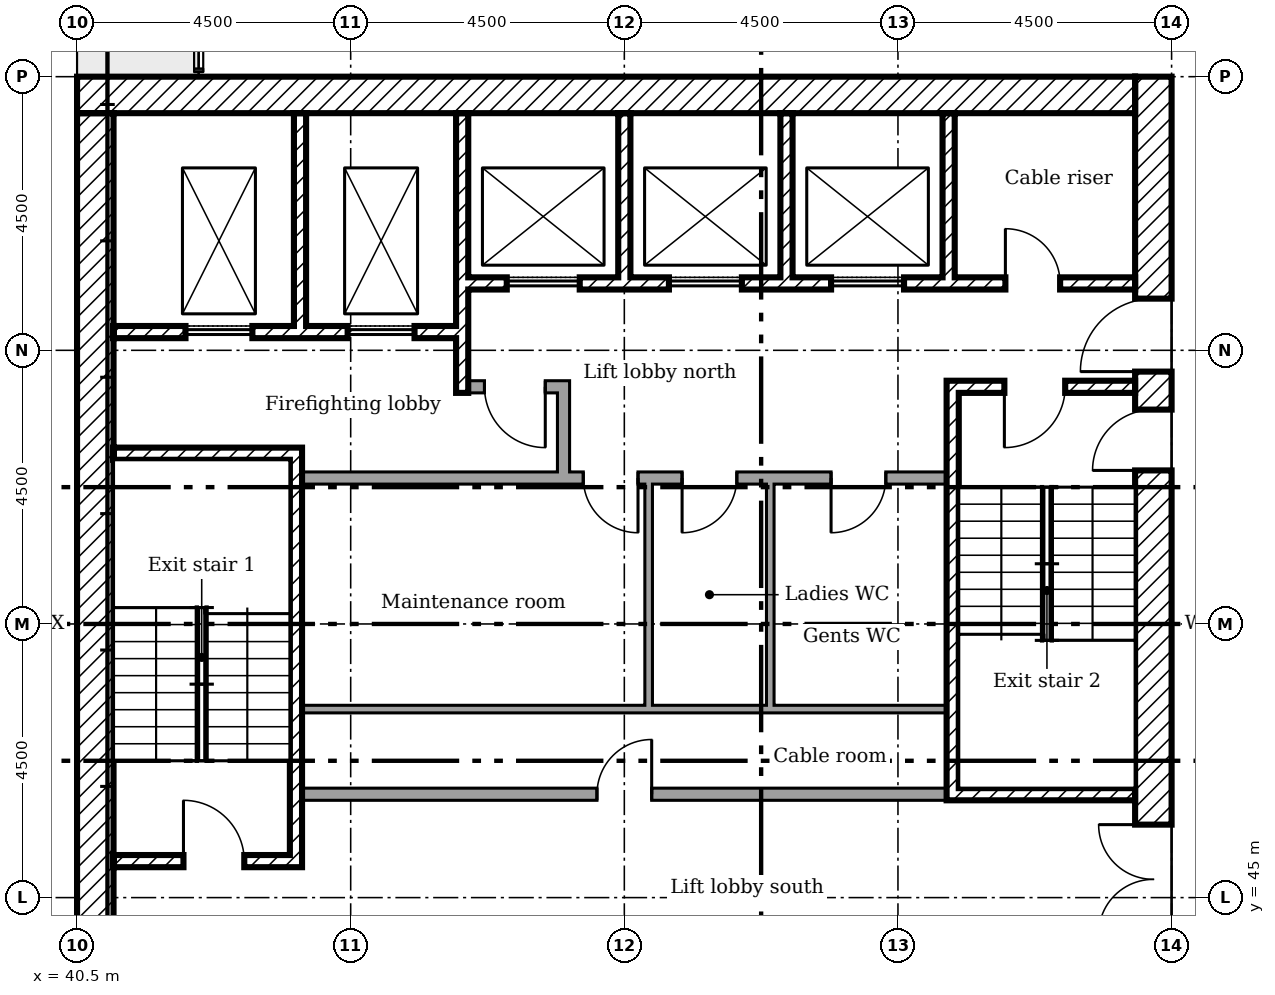
"""IFC4 building model, lengths in metres.
Left out: names, types, materials, properties, quantities, classifications, styles, units other than length and angle.
Written with IfcOpenShell. Run it as: python <this file> out.ifc"""

import sys

from ifc_helpers import new_model, si_unit, direction, frame, frame_2d, origin, place, context, subcontext, project, spatial, rectangle, extrude, element, fill, save


model = new_model("IFC4")
c1 = context("Model", 3, precision=1e-05, world=origin(), true_north=direction((0.0, 1.0)))
c2 = subcontext(c1, "Body", "Model", "MODEL_VIEW")
j1 = project(units=[si_unit("LENGTHUNIT", "METRE"), si_unit("PLANEANGLEUNIT", "RADIAN")], contexts=[c1])
p1 = place(None, origin())
s1 = spatial("IfcSite", under=j1, at=p1, CompositionType="ELEMENT")
p2 = place(p1, origin())
s2 = spatial("IfcBuilding", under=s1, at=p2, CompositionType="ELEMENT")
p3 = place(p2, frame((0.0, 0.0, 172.6)))
s3 = spatial("IfcBuildingStorey", under=s2, at=p3, CompositionType="ELEMENT", Elevation=172.6)
p4 = place(p3, frame((58.2, 40.5, 0.0), z_axis=(0.0, 0.0, 1.0), x_axis=(0.0, 1.0, 0.0)))
e1 = element("IfcWall", 1, at=p4, inside=s3, PredefinedType="SHEAR", context=c2, shape_type="SweptSolid", body=[
    extrude(rectangle(XDim=18.0, YDim=0.6, at=frame_2d((9.0, 0.0))), origin(), (0.0, 0.0, 1.0), 3.35),
])
p5 = place(p4, frame((13.15, 0.0, 0.0)))
e2 = element("IfcOpeningElement", 2, at=p5, cuts=e1, PredefinedType="OPENING", context=c2, shape_type="SweptSolid", body=[
    extrude(rectangle(XDim=1.2, YDim=2.1, at=frame_2d((0.6, 1.05))), frame((0.0, 0.31, 0.0), z_axis=(0.0, -1.0, 0.0), x_axis=(1.0, 0.0, 0.0)), (0.0, 0.0, 1.0), 0.62),
])
p6 = place(p4, frame((3.9, 0.0, 0.0)))
e3 = element("IfcOpeningElement", 3, at=p6, cuts=e1, PredefinedType="OPENING", context=c2, shape_type="SweptSolid", body=[
    extrude(rectangle(XDim=1.8, YDim=2.1, at=frame_2d((0.9, 1.05))), frame((0.0, 0.31, 0.0), z_axis=(0.0, -1.0, 0.0), x_axis=(1.0, 0.0, 0.0)), (0.0, 0.0, 1.0), 0.62),
])
p7 = place(p4, frame((11.525, 0.0, 0.0)))
e4 = element("IfcOpeningElement", 4, at=p7, cuts=e1, PredefinedType="OPENING", context=c2, shape_type="SweptSolid", body=[
    extrude(rectangle(XDim=1.0, YDim=2.1, at=frame_2d((0.5, 1.05))), frame((0.0, 0.31, 0.0), z_axis=(0.0, -1.0, 0.0), x_axis=(1.0, 0.0, 0.0)), (0.0, 0.0, 1.0), 0.62),
])
p8 = place(p3, frame((40.5, 58.2, 0.0)))
e5 = element("IfcWall", 5, at=p8, inside=s3, PredefinedType="SHEAR", context=c2, shape_type="SweptSolid", body=[
    extrude(rectangle(XDim=17.4, YDim=0.6, at=frame_2d((8.7, 0.0))), origin(), (0.0, 0.0, 1.0), 3.35),
])
p9 = place(p3, frame((40.8, 41.1, 0.0), z_axis=(0.0, 0.0, 1.0), x_axis=(0.0, 1.0, 0.0)))
e6 = element("IfcWall", 6, at=p9, inside=s3, PredefinedType="SHEAR", context=c2, shape_type="SweptSolid", body=[
    extrude(rectangle(XDim=16.8, YDim=0.6, at=frame_2d((8.4, 0.0))), origin(), (0.0, 0.0, 1.0), 3.35),
])
p10 = place(p3, frame((44.167, 57.9, 0.0), z_axis=(0.0, 0.0, 1.0), x_axis=(0.0, -1.0, 0.0)))
e7 = element("IfcWall", 7, at=p10, inside=s3, PredefinedType="SHEAR", context=c2, shape_type="SweptSolid", body=[
    extrude(rectangle(XDim=3.5, YDim=0.2, at=frame_2d((1.75, 0.0))), origin(), (0.0, 0.0, 1.0), 3.35),
])
p11 = place(p3, frame((46.833, 57.9, 0.0), z_axis=(0.0, 0.0, 1.0), x_axis=(0.0, -1.0, 0.0)))
e8 = element("IfcWall", 8, at=p11, inside=s3, PredefinedType="SHEAR", context=c2, shape_type="SweptSolid", body=[
    extrude(rectangle(XDim=4.6, YDim=0.2, at=frame_2d((2.3, 0.0))), origin(), (0.0, 0.0, 1.0), 3.35),
])
for number, where, z_axis, x_axis in (
    (9, (49.5, 57.9, 0.0), (0.0, 0.0, 1.0), (0.0, -1.0, 0.0)),
    (10, (52.167, 57.9, 0.0), (0.0, 0.0, 1.0), (0.0, -1.0, 0.0)),
    (11, (54.833, 57.9, 0.0), (0.0, 0.0, 1.0), (0.0, -1.0, 0.0)),
):
    element("IfcWall", number, at=place(p3, frame(where, z_axis=z_axis, x_axis=x_axis)), inside=s3, PredefinedType="SHEAR", context=c2, shape_type="SweptSolid", body=[
        extrude(rectangle(XDim=2.7, YDim=0.2, at=frame_2d((1.35, 0.0))), origin(), (0.0, 0.0, 1.0), 3.35),
    ])
p12 = place(p3, frame((48.5, 51.9, 0.0), z_axis=(0.0, 0.0, 1.0), x_axis=(0.0, 1.0, 0.0)))
e12 = element("IfcWall", 12, at=p12, inside=s3, PredefinedType="PARTITIONING", context=c2, shape_type="SweptSolid", body=[
    extrude(rectangle(XDim=1.6, YDim=0.2, at=frame_2d((0.8, 0.0))), origin(), (0.0, 0.0, 1.0), 3.35),
])
p13 = place(p3, frame((46.933, 53.4, 0.0)))
e13 = element("IfcWall", 13, at=p13, inside=s3, PredefinedType="PARTITIONING", context=c2, shape_type="SweptSolid", body=[
    extrude(rectangle(XDim=1.467, YDim=0.2, at=frame_2d((0.733, 0.0))), origin(), (0.0, 0.0, 1.0), 3.35),
])
p14 = place(p13, frame((0.267, 0.0, 0.0)))
e14 = element("IfcOpeningElement", 14, at=p14, cuts=e13, PredefinedType="OPENING", context=c2, shape_type="SweptSolid", body=[
    extrude(rectangle(XDim=1.0, YDim=2.1, at=frame_2d((0.5, 1.05))), frame((0.0, 0.11, 0.0), z_axis=(0.0, -1.0, 0.0), x_axis=(1.0, 0.0, 0.0)), (0.0, 0.0, 1.0), 0.22),
])
p15 = place(p3, frame((46.933, 55.1, 0.0)))
e15 = element("IfcWall", 15, at=p15, inside=s3, PredefinedType="SHEAR", context=c2, shape_type="SweptSolid", body=[
    extrude(rectangle(XDim=10.967, YDim=0.2, at=frame_2d((5.483, 0.0))), origin(), (0.0, 0.0, 1.0), 3.35),
])
p16 = place(p15, frame((8.833, 0.0, 0.0)))
e16 = element("IfcOpeningElement", 16, at=p16, cuts=e15, PredefinedType="OPENING", context=c2, shape_type="SweptSolid", body=[
    extrude(rectangle(XDim=0.9, YDim=2.1, at=frame_2d((0.45, 1.05))), frame((0.0, 0.11, 0.0), z_axis=(0.0, -1.0, 0.0), x_axis=(1.0, 0.0, 0.0)), (0.0, 0.0, 1.0), 0.22),
])
p17 = place(p15, frame((0.633, 0.0, 0.0)))
e17 = element("IfcOpeningElement", 17, at=p17, cuts=e15, PredefinedType="OPENING", context=c2, shape_type="SweptSolid", body=[
    extrude(rectangle(XDim=1.2, YDim=2.1, at=frame_2d((0.6, 1.05))), frame((0.0, 0.11, 0.0), z_axis=(0.0, -1.0, 0.0), x_axis=(1.0, 0.0, 0.0)), (0.0, 0.0, 1.0), 0.22),
])
p18 = place(p15, frame((3.3, 0.0, 0.0)))
e18 = element("IfcOpeningElement", 18, at=p18, cuts=e15, PredefinedType="OPENING", context=c2, shape_type="SweptSolid", body=[
    extrude(rectangle(XDim=1.2, YDim=2.1, at=frame_2d((0.6, 1.05))), frame((0.0, 0.11, 0.0), z_axis=(0.0, -1.0, 0.0), x_axis=(1.0, 0.0, 0.0)), (0.0, 0.0, 1.0), 0.22),
])
p19 = place(p15, frame((5.967, 0.0, 0.0)))
e19 = element("IfcOpeningElement", 19, at=p19, cuts=e15, PredefinedType="OPENING", context=c2, shape_type="SweptSolid", body=[
    extrude(rectangle(XDim=1.2, YDim=2.1, at=frame_2d((0.6, 1.05))), frame((0.0, 0.11, 0.0), z_axis=(0.0, -1.0, 0.0), x_axis=(1.0, 0.0, 0.0)), (0.0, 0.0, 1.0), 0.22),
])
p20 = place(p3, frame((41.1, 54.3, 0.0)))
e20 = element("IfcWall", 20, at=p20, inside=s3, PredefinedType="SHEAR", context=c2, shape_type="SweptSolid", body=[
    extrude(rectangle(XDim=5.633, YDim=0.2, at=frame_2d((2.817, 0.0))), origin(), (0.0, 0.0, 1.0), 3.35),
])
p21 = place(p20, frame((1.183, 0.0, 0.0)))
e21 = element("IfcOpeningElement", 21, at=p21, cuts=e20, PredefinedType="OPENING", context=c2, shape_type="SweptSolid", body=[
    extrude(rectangle(XDim=1.1, YDim=2.1, at=frame_2d((0.55, 1.05))), frame((0.0, 0.11, 0.0), z_axis=(0.0, -1.0, 0.0), x_axis=(1.0, 0.0, 0.0)), (0.0, 0.0, 1.0), 0.22),
])
p22 = place(p20, frame((3.85, 0.0, 0.0)))
e22 = element("IfcOpeningElement", 22, at=p22, cuts=e20, PredefinedType="OPENING", context=c2, shape_type="SweptSolid", body=[
    extrude(rectangle(XDim=1.1, YDim=2.1, at=frame_2d((0.55, 1.05))), frame((0.0, 0.11, 0.0), z_axis=(0.0, -1.0, 0.0), x_axis=(1.0, 0.0, 0.0)), (0.0, 0.0, 1.0), 0.22),
])
p23 = place(p3, frame((44.1, 45.5, 0.0), z_axis=(0.0, 0.0, 1.0), x_axis=(0.0, 1.0, 0.0)))
e23 = element("IfcWall", 23, at=p23, inside=s3, PredefinedType="SHEAR", context=c2, shape_type="SweptSolid", body=[
    extrude(rectangle(XDim=6.9, YDim=0.2, at=frame_2d((3.45, 0.0))), origin(), (0.0, 0.0, 1.0), 3.35),
])
p24 = place(p3, frame((41.1, 52.3, 0.0)))
e24 = element("IfcWall", 24, at=p24, inside=s3, PredefinedType="SHEAR", context=c2, shape_type="SweptSolid", body=[
    extrude(rectangle(XDim=2.9, YDim=0.2, at=frame_2d((1.45, 0.0))), origin(), (0.0, 0.0, 1.0), 3.35),
])
p25 = place(p3, frame((41.1, 45.6, 0.0)))
e25 = element("IfcWall", 25, at=p25, inside=s3, PredefinedType="SHEAR", context=c2, shape_type="SweptSolid", body=[
    extrude(rectangle(XDim=2.9, YDim=0.2, at=frame_2d((1.45, 0.0))), origin(), (0.0, 0.0, 1.0), 3.35),
])
p26 = place(p25, frame((1.15, 0.0, 0.0)))
e26 = element("IfcOpeningElement", 26, at=p26, cuts=e25, PredefinedType="OPENING", context=c2, shape_type="SweptSolid", body=[
    extrude(rectangle(XDim=1.0, YDim=2.1, at=frame_2d((0.5, 1.05))), frame((0.0, 0.11, 0.0), z_axis=(0.0, -1.0, 0.0), x_axis=(1.0, 0.0, 0.0)), (0.0, 0.0, 1.0), 0.22),
])
p27 = place(p3, frame((54.8, 53.4, 0.0)))
e27 = element("IfcWall", 27, at=p27, inside=s3, PredefinedType="SHEAR", context=c2, shape_type="SweptSolid", body=[
    extrude(rectangle(XDim=3.1, YDim=0.2, at=frame_2d((1.55, 0.0))), origin(), (0.0, 0.0, 1.0), 3.35),
])
p28 = place(p27, frame((0.95, 0.0, 0.0)))
e28 = element("IfcOpeningElement", 28, at=p28, cuts=e27, PredefinedType="OPENING", context=c2, shape_type="SweptSolid", body=[
    extrude(rectangle(XDim=1.0, YDim=2.1, at=frame_2d((0.5, 1.05))), frame((0.0, 0.11, 0.0), z_axis=(0.0, -1.0, 0.0), x_axis=(1.0, 0.0, 0.0)), (0.0, 0.0, 1.0), 0.22),
])
p29 = place(p3, frame((54.8, 46.7, 0.0)))
e29 = element("IfcWall", 29, at=p29, inside=s3, PredefinedType="SHEAR", context=c2, shape_type="SweptSolid", body=[
    extrude(rectangle(XDim=3.1, YDim=0.2, at=frame_2d((1.55, 0.0))), origin(), (0.0, 0.0, 1.0), 3.35),
])
p30 = place(p3, frame((54.9, 46.8, 0.0), z_axis=(0.0, 0.0, 1.0), x_axis=(0.0, 1.0, 0.0)))
e30 = element("IfcWall", 30, at=p30, inside=s3, PredefinedType="SHEAR", context=c2, shape_type="SweptSolid", body=[
    extrude(rectangle(XDim=6.5, YDim=0.2, at=frame_2d((3.25, 0.0))), origin(), (0.0, 0.0, 1.0), 3.35),
])
p31 = place(p3, frame((44.2, 51.9, 0.0)))
e31 = element("IfcWall", 31, at=p31, inside=s3, PredefinedType="PARTITIONING", context=c2, shape_type="SweptSolid", body=[
    extrude(rectangle(XDim=10.6, YDim=0.2, at=frame_2d((5.3, 0.0))), origin(), (0.0, 0.0, 1.0), 3.35),
])
p32 = place(p31, frame((4.625, 0.0, 0.0)))
e32 = element("IfcOpeningElement", 32, at=p32, cuts=e31, PredefinedType="OPENING", context=c2, shape_type="SweptSolid", body=[
    extrude(rectangle(XDim=0.9, YDim=2.1, at=frame_2d((0.45, 1.05))), frame((0.0, 0.11, 0.0), z_axis=(0.0, -1.0, 0.0), x_axis=(1.0, 0.0, 0.0)), (0.0, 0.0, 1.0), 0.22),
])
p33 = place(p31, frame((6.25, 0.0, 0.0)))
e33 = element("IfcOpeningElement", 33, at=p33, cuts=e31, PredefinedType="OPENING", context=c2, shape_type="SweptSolid", body=[
    extrude(rectangle(XDim=0.9, YDim=2.1, at=frame_2d((0.45, 1.05))), frame((0.0, 0.11, 0.0), z_axis=(0.0, -1.0, 0.0), x_axis=(1.0, 0.0, 0.0)), (0.0, 0.0, 1.0), 0.22),
])
p34 = place(p31, frame((8.7, 0.0, 0.0)))
e34 = element("IfcOpeningElement", 34, at=p34, cuts=e31, PredefinedType="OPENING", context=c2, shape_type="SweptSolid", body=[
    extrude(rectangle(XDim=0.9, YDim=2.1, at=frame_2d((0.45, 1.05))), frame((0.0, 0.11, 0.0), z_axis=(0.0, -1.0, 0.0), x_axis=(1.0, 0.0, 0.0)), (0.0, 0.0, 1.0), 0.22),
])
p35 = place(p3, frame((44.2, 46.7, 0.0)))
e35 = element("IfcWall", 35, at=p35, inside=s3, PredefinedType="PARTITIONING", context=c2, shape_type="SweptSolid", body=[
    extrude(rectangle(XDim=10.6, YDim=0.2, at=frame_2d((5.3, 0.0))), origin(), (0.0, 0.0, 1.0), 3.35),
])
p36 = place(p35, frame((4.85, 0.0, 0.0)))
e36 = element("IfcOpeningElement", 36, at=p36, cuts=e35, PredefinedType="OPENING", context=c2, shape_type="SweptSolid", body=[
    extrude(rectangle(XDim=0.9, YDim=2.1, at=frame_2d((0.45, 1.05))), frame((0.0, 0.11, 0.0), z_axis=(0.0, -1.0, 0.0), x_axis=(1.0, 0.0, 0.0)), (0.0, 0.0, 1.0), 0.22),
])
p37 = place(p3, frame((49.962, 48.1, 0.0), z_axis=(0.0, 0.0, 1.0), x_axis=(-1.0, 0.0, 0.0)))
e37 = element("IfcWall", 37, at=p37, inside=s3, PredefinedType="PARTITIONING", context=c2, shape_type="SweptSolid", body=[
    extrude(rectangle(XDim=5.762, YDim=0.125, at=frame_2d((2.881, 0.0))), origin(), (0.0, 0.0, 1.0), 3.35),
])
p38 = place(p3, frame((51.962, 48.1, 0.0), z_axis=(0.0, 0.0, 1.0), x_axis=(-1.0, 0.0, 0.0)))
e38 = element("IfcWall", 38, at=p38, inside=s3, PredefinedType="PARTITIONING", context=c2, shape_type="SweptSolid", body=[
    extrude(rectangle(XDim=2.062, YDim=0.125, at=frame_2d((1.031, 0.0))), origin(), (0.0, 0.0, 1.0), 3.35),
])
p39 = place(p3, frame((49.9, 48.163, 0.0), z_axis=(0.0, 0.0, 1.0), x_axis=(0.0, 1.0, 0.0)))
e39 = element("IfcWall", 39, at=p39, inside=s3, PredefinedType="PARTITIONING", context=c2, shape_type="SweptSolid", body=[
    extrude(rectangle(XDim=3.637, YDim=0.125, at=frame_2d((1.819, 0.0))), origin(), (0.0, 0.0, 1.0), 3.35),
])
p40 = place(p3, frame((54.8, 48.1, 0.0), z_axis=(0.0, 0.0, 1.0), x_axis=(-1.0, 0.0, 0.0)))
e40 = element("IfcWall", 40, at=p40, inside=s3, PredefinedType="PARTITIONING", context=c2, shape_type="SweptSolid", body=[
    extrude(rectangle(XDim=2.9, YDim=0.125, at=frame_2d((1.45, 0.0))), origin(), (0.0, 0.0, 1.0), 3.35),
])
p41 = place(p3, frame((51.9, 48.163, 0.0), z_axis=(0.0, 0.0, 1.0), x_axis=(0.0, 1.0, 0.0)))
e41 = element("IfcWall", 41, at=p41, inside=s3, PredefinedType="PARTITIONING", context=c2, shape_type="SweptSolid", body=[
    extrude(rectangle(XDim=3.637, YDim=0.125, at=frame_2d((1.819, 0.0))), origin(), (0.0, 0.0, 1.0), 3.35),
])
p42 = place(p5, origin())
e42 = element("IfcDoor", 42, at=p42, inside=s3, OperationType="SINGLE_SWING_RIGHT", PredefinedType="DOOR", context=c2, shape_type="SweptSolid", body=[
    extrude(rectangle(XDim=1.2, YDim=2.1, at=frame_2d((0.6, 1.05))), frame((0.0, 0.025, 0.0), z_axis=(0.0, -1.0, 0.0), x_axis=(1.0, 0.0, 0.0)), (0.0, 0.0, 1.0), 0.05),
])
fill(e2, e42)
p43 = place(p6, origin())
e43 = element("IfcDoor", 43, at=p43, inside=s3, OperationType="DOUBLE_DOOR_SINGLE_SWING", PredefinedType="DOOR", context=c2, shape_type="SweptSolid", body=[
    extrude(rectangle(XDim=1.8, YDim=2.1, at=frame_2d((0.9, 1.05))), frame((0.0, 0.025, 0.0), z_axis=(0.0, -1.0, 0.0), x_axis=(1.0, 0.0, 0.0)), (0.0, 0.0, 1.0), 0.05),
])
fill(e3, e43)
p44 = place(p26, origin())
e44 = element("IfcDoor", 44, at=p44, inside=s3, OperationType="SINGLE_SWING_RIGHT", PredefinedType="DOOR", context=c2, shape_type="SweptSolid", body=[
    extrude(rectangle(XDim=1.0, YDim=2.1, at=frame_2d((0.5, 1.05))), frame((0.0, 0.025, 0.0), z_axis=(0.0, -1.0, 0.0), x_axis=(1.0, 0.0, 0.0)), (0.0, 0.0, 1.0), 0.05),
])
fill(e26, e44)
p45 = place(p28, frame((1.0, 0.0, 0.0), x_axis=(-1.0, 0.0, 0.0)))
e45 = element("IfcDoor", 45, at=p45, inside=s3, OperationType="SINGLE_SWING_LEFT", PredefinedType="DOOR", context=c2, shape_type="SweptSolid", body=[
    extrude(rectangle(XDim=1.0, YDim=2.1, at=frame_2d((0.5, 1.05))), frame((0.0, 0.025, 0.0), z_axis=(0.0, -1.0, 0.0), x_axis=(1.0, 0.0, 0.0)), (0.0, 0.0, 1.0), 0.05),
])
fill(e28, e45)
p46 = place(p7, origin())
e46 = element("IfcDoor", 46, at=p46, inside=s3, OperationType="SINGLE_SWING_RIGHT", PredefinedType="DOOR", context=c2, shape_type="SweptSolid", body=[
    extrude(rectangle(XDim=1.0, YDim=2.1, at=frame_2d((0.5, 1.05))), frame((0.0, 0.025, 0.0), z_axis=(0.0, -1.0, 0.0), x_axis=(1.0, 0.0, 0.0)), (0.0, 0.0, 1.0), 0.05),
])
fill(e4, e46)
p47 = place(p14, frame((1.0, 0.0, 0.0), x_axis=(-1.0, 0.0, 0.0)))
e47 = element("IfcDoor", 47, at=p47, inside=s3, OperationType="SINGLE_SWING_RIGHT", PredefinedType="DOOR", context=c2, shape_type="SweptSolid", body=[
    extrude(rectangle(XDim=1.0, YDim=2.1, at=frame_2d((0.5, 1.05))), frame((0.0, 0.025, 0.0), z_axis=(0.0, -1.0, 0.0), x_axis=(1.0, 0.0, 0.0)), (0.0, 0.0, 1.0), 0.05),
])
fill(e14, e47)
p48 = place(p16, origin())
e48 = element("IfcDoor", 48, at=p48, inside=s3, OperationType="SINGLE_SWING_RIGHT", PredefinedType="DOOR", context=c2, shape_type="SweptSolid", body=[
    extrude(rectangle(XDim=0.9, YDim=2.1, at=frame_2d((0.45, 1.05))), frame((0.0, 0.025, 0.0), z_axis=(0.0, -1.0, 0.0), x_axis=(1.0, 0.0, 0.0)), (0.0, 0.0, 1.0), 0.05),
])
fill(e16, e48)
p49 = place(p36, origin())
e49 = element("IfcDoor", 49, at=p49, inside=s3, OperationType="SINGLE_SWING_LEFT", PredefinedType="DOOR", context=c2, shape_type="SweptSolid", body=[
    extrude(rectangle(XDim=0.9, YDim=2.1, at=frame_2d((0.45, 1.05))), frame((0.0, 0.025, 0.0), z_axis=(0.0, -1.0, 0.0), x_axis=(1.0, 0.0, 0.0)), (0.0, 0.0, 1.0), 0.05),
])
fill(e36, e49)
p50 = place(p32, frame((0.9, 0.0, 0.0), x_axis=(-1.0, 0.0, 0.0)))
e50 = element("IfcDoor", 50, at=p50, inside=s3, OperationType="SINGLE_SWING_RIGHT", PredefinedType="DOOR", context=c2, shape_type="SweptSolid", body=[
    extrude(rectangle(XDim=0.9, YDim=2.1, at=frame_2d((0.45, 1.05))), frame((0.0, 0.025, 0.0), z_axis=(0.0, -1.0, 0.0), x_axis=(1.0, 0.0, 0.0)), (0.0, 0.0, 1.0), 0.05),
])
fill(e32, e50)
p51 = place(p33, frame((0.9, 0.0, 0.0), x_axis=(-1.0, 0.0, 0.0)))
e51 = element("IfcDoor", 51, at=p51, inside=s3, OperationType="SINGLE_SWING_LEFT", PredefinedType="DOOR", context=c2, shape_type="SweptSolid", body=[
    extrude(rectangle(XDim=0.9, YDim=2.1, at=frame_2d((0.45, 1.05))), frame((0.0, 0.025, 0.0), z_axis=(0.0, -1.0, 0.0), x_axis=(1.0, 0.0, 0.0)), (0.0, 0.0, 1.0), 0.05),
])
fill(e33, e51)
p52 = place(p34, frame((0.9, 0.0, 0.0), x_axis=(-1.0, 0.0, 0.0)))
e52 = element("IfcDoor", 52, at=p52, inside=s3, OperationType="SINGLE_SWING_LEFT", PredefinedType="DOOR", context=c2, shape_type="SweptSolid", body=[
    extrude(rectangle(XDim=0.9, YDim=2.1, at=frame_2d((0.45, 1.05))), frame((0.0, 0.025, 0.0), z_axis=(0.0, -1.0, 0.0), x_axis=(1.0, 0.0, 0.0)), (0.0, 0.0, 1.0), 0.05),
])
fill(e34, e52)
p53 = place(p21, origin())
e53 = element("IfcDoor", 53, at=p53, inside=s3, OperationType="SLIDING_TO_LEFT", PredefinedType="DOOR", context=c2, shape_type="SweptSolid", body=[
    extrude(rectangle(XDim=1.1, YDim=2.1, at=frame_2d((0.55, 1.05))), frame((0.0, 0.025, 0.0), z_axis=(0.0, -1.0, 0.0), x_axis=(1.0, 0.0, 0.0)), (0.0, 0.0, 1.0), 0.05),
])
fill(e21, e53)
p54 = place(p22, origin())
e54 = element("IfcDoor", 54, at=p54, inside=s3, OperationType="SLIDING_TO_LEFT", PredefinedType="DOOR", context=c2, shape_type="SweptSolid", body=[
    extrude(rectangle(XDim=1.1, YDim=2.1, at=frame_2d((0.55, 1.05))), frame((0.0, 0.025, 0.0), z_axis=(0.0, -1.0, 0.0), x_axis=(1.0, 0.0, 0.0)), (0.0, 0.0, 1.0), 0.05),
])
fill(e22, e54)
p55 = place(p17, origin())
e55 = element("IfcDoor", 55, at=p55, inside=s3, OperationType="SLIDING_TO_LEFT", PredefinedType="DOOR", context=c2, shape_type="SweptSolid", body=[
    extrude(rectangle(XDim=1.2, YDim=2.1, at=frame_2d((0.6, 1.05))), frame((0.0, 0.025, 0.0), z_axis=(0.0, -1.0, 0.0), x_axis=(1.0, 0.0, 0.0)), (0.0, 0.0, 1.0), 0.05),
])
fill(e17, e55)
p56 = place(p18, origin())
e56 = element("IfcDoor", 56, at=p56, inside=s3, OperationType="SLIDING_TO_LEFT", PredefinedType="DOOR", context=c2, shape_type="SweptSolid", body=[
    extrude(rectangle(XDim=1.2, YDim=2.1, at=frame_2d((0.6, 1.05))), frame((0.0, 0.025, 0.0), z_axis=(0.0, -1.0, 0.0), x_axis=(1.0, 0.0, 0.0)), (0.0, 0.0, 1.0), 0.05),
])
fill(e18, e56)
p57 = place(p19, origin())
e57 = element("IfcDoor", 57, at=p57, inside=s3, OperationType="SLIDING_TO_LEFT", PredefinedType="DOOR", context=c2, shape_type="SweptSolid", body=[
    extrude(rectangle(XDim=1.2, YDim=2.1, at=frame_2d((0.6, 1.05))), frame((0.0, 0.025, 0.0), z_axis=(0.0, -1.0, 0.0), x_axis=(1.0, 0.0, 0.0)), (0.0, 0.0, 1.0), 0.05),
])
fill(e19, e57)
save(model, sys.argv[1])
